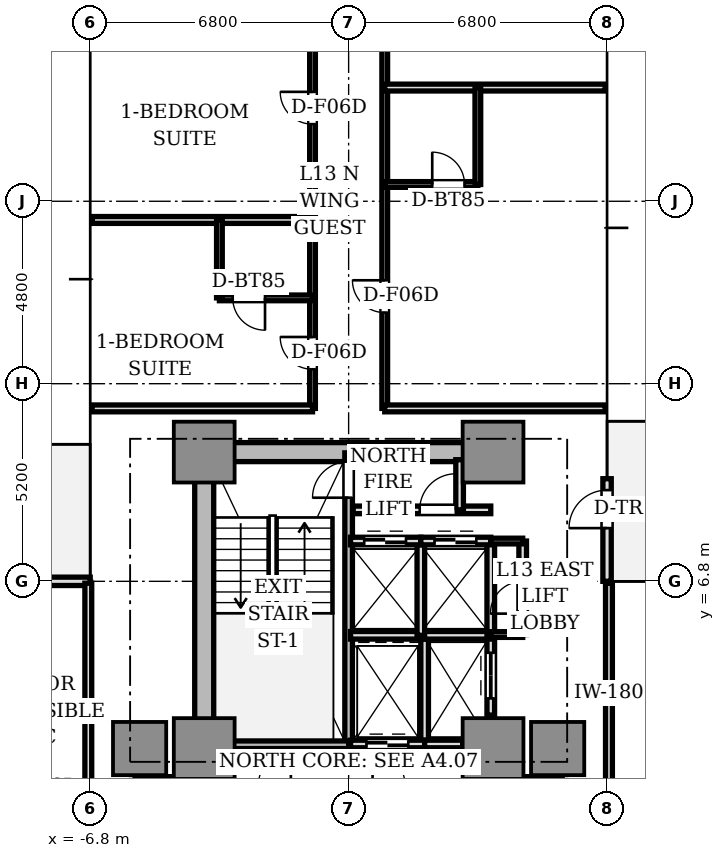
"""IFC4 building model, lengths in metres.
Left out: names, types, materials, properties, quantities, classifications, styles, units other than length and angle.
Written with IfcOpenShell. Run it as: python <this file> out.ifc"""

import sys

from ifc_helpers import new_model, si_unit, direction, frame, frame_2d, origin, origin_2d, place, context, subcontext, project, spatial, rectangle, extrude, source, transform, mapped, element, fill, save


model = new_model("IFC4")
c1 = context("Model", 3, precision=1e-05, world=origin(), true_north=direction((0.0, 1.0)))
c2 = subcontext(c1, "Body", "Model", "MODEL_VIEW")
j1 = project(units=[si_unit("LENGTHUNIT", "METRE"), si_unit("PLANEANGLEUNIT", "RADIAN")], contexts=[c1])
p1 = place(None, origin())
s1 = spatial("IfcSite", under=j1, at=p1, CompositionType="ELEMENT")
p2 = place(p1, origin())
s2 = spatial("IfcBuilding", under=s1, at=p2, CompositionType="ELEMENT")
p3 = place(p2, frame((0.0, 0.0, 51.05)))
s3 = spatial("IfcBuildingStorey", under=s2, at=p3, CompositionType="ELEMENT", Elevation=51.05)
p4 = place(p3, frame((-3.55, 10.2, 0.0), z_axis=(0.0, 0.0, 1.0), x_axis=(1.0, 0.0, 0.0)))
e1 = element("IfcWall", 1, at=p4, inside=s3, PredefinedType="SHEAR", context=c2, shape_type="SweptSolid", body=[
    extrude(rectangle(XDim=7.1, YDim=0.5, at=frame_2d((3.55, 0.0))), origin(), (0.0, 0.0, 1.0), 3.11),
])
p5 = place(p3, frame((-3.8, 2.85, 0.0), z_axis=(0.0, 0.0, 1.0), x_axis=(0.0, 1.0, 0.0)))
e2 = element("IfcWall", 2, at=p5, inside=s3, PredefinedType="SHEAR", context=c2, shape_type="SweptSolid", body=[
    extrude(rectangle(XDim=6.9, YDim=0.5, at=frame_2d((3.45, 0.0))), origin(), (0.0, 0.0, 1.0), 3.11),
])
m1 = source(origin(), c2, "Body", "SweptSolid", [
    extrude(rectangle(XDim=1.6, YDim=1.6, at=origin_2d()), origin(), (0.0, 0.0, 1.0), 3.11),
])
for number, where, z_axis, x_axis in (
    (3, (-3.8, 2.4, 0.0), (0.0, 0.0, 1.0), (1.0, 0.0, 0.0)),
    (4, (3.8, 2.4, 0.0), (0.0, 0.0, 1.0), (1.0, 0.0, 0.0)),
    (5, (-3.8, 10.2, 0.0), (0.0, 0.0, 1.0), (1.0, 0.0, 0.0)),
    (6, (3.8, 10.2, 0.0), (0.0, 0.0, 1.0), (1.0, 0.0, 0.0)),
):
    element("IfcColumn", number, at=place(p3, frame(where, z_axis=z_axis, x_axis=x_axis)), inside=s3, PredefinedType="COLUMN", context=c2, shape_type="MappedRepresentation", body=[
        mapped(m1, transform((0.0, 0.0, 0.0), scale=1.0)),
    ])
m2 = source(origin(), c2, "Body", "SweptSolid", [
    extrude(rectangle(XDim=1.4, YDim=1.4, at=origin_2d()), origin(), (0.0, 0.0, 1.0), 3.11),
])
for number, where, z_axis, x_axis in (
    (7, (5.5, 2.4, 0.0), (0.0, 0.0, 1.0), (1.0, 0.0, 0.0)),
    (8, (-5.5, 2.4, 0.0), (0.0, 0.0, 1.0), (1.0, 0.0, 0.0)),
):
    element("IfcColumn", number, at=place(p3, frame(where, z_axis=z_axis, x_axis=x_axis)), inside=s3, PredefinedType="COLUMN", context=c2, shape_type="MappedRepresentation", body=[
        mapped(m2, transform((0.0, 0.0, 0.0), scale=1.0)),
    ])
p6 = place(p3, frame((6.8, 6.8, 0.0), z_axis=(0.0, 0.0, 1.0), x_axis=(0.0, 1.0, 0.0)))
e9 = element("IfcWall", 9, at=p6, inside=s3, PredefinedType="STANDARD", context=c2, shape_type="SweptSolid", body=[
    extrude(rectangle(XDim=2.7, YDim=0.22, at=frame_2d((1.35, 0.0))), origin(), (0.0, 0.0, 1.0), 3.11),
])
p7 = place(p6, frame((1.4, 0.0, 0.0)))
e10 = element("IfcOpeningElement", 10, at=p7, cuts=e9, PredefinedType="OPENING", context=c2, shape_type="SweptSolid", body=[
    extrude(rectangle(XDim=1.0, YDim=2.2, at=frame_2d((0.5, 1.1))), frame((0.0, 0.12, 0.0), z_axis=(0.0, -1.0, 0.0), x_axis=(1.0, 0.0, 0.0)), (0.0, 0.0, 1.0), 0.24),
])
p8 = place(p3, frame((-6.8, 6.8, 0.0), z_axis=(0.0, 0.0, 1.0), x_axis=(-1.0, 0.0, 0.0)))
e11 = element("IfcWall", 11, at=p8, inside=s3, PredefinedType="STANDARD", context=c2, shape_type="SweptSolid", body=[
    extrude(rectangle(XDim=2.7, YDim=0.22, at=frame_2d((1.35, 0.0))), origin(), (0.0, 0.0, 1.0), 3.11),
])
p9 = place(p8, frame((1.4, 0.0, 0.0)))
e12 = element("IfcOpeningElement", 12, at=p9, cuts=e11, PredefinedType="OPENING", context=c2, shape_type="SweptSolid", body=[
    extrude(rectangle(XDim=1.0, YDim=2.2, at=frame_2d((0.5, 1.1))), frame((0.0, 0.12, 0.0), z_axis=(0.0, -1.0, 0.0), x_axis=(1.0, 0.0, 0.0)), (0.0, 0.0, 1.0), 0.24),
])
p10 = place(p3, frame((0.0, 2.5, 0.0), z_axis=(0.0, 0.0, 1.0), x_axis=(0.0, 1.0, 0.0)))
e13 = element("IfcWall", 13, at=p10, inside=s3, PredefinedType="SOLIDWALL", context=c2, shape_type="SweptSolid", body=[
    extrude(rectangle(XDim=7.68, YDim=0.2, at=frame_2d((3.84, 0.0))), origin(), (0.0, 0.0, 1.0), 3.11),
])
p11 = place(p10, frame((6.5, 0.0, 0.0)))
e14 = element("IfcOpeningElement", 14, at=p11, cuts=e13, PredefinedType="OPENING", context=c2, shape_type="SweptSolid", body=[
    extrude(rectangle(XDim=0.95, YDim=2.15, at=frame_2d((0.475, 1.075))), frame((0.0, 0.11, 0.0), z_axis=(0.0, -1.0, 0.0), x_axis=(1.0, 0.0, 0.0)), (0.0, 0.0, 1.0), 0.22),
])
p12 = place(p3, frame((-3.72, 2.5, 0.0), z_axis=(0.0, 0.0, 1.0), x_axis=(1.0, 0.0, 0.0)))
e15 = element("IfcWall", 15, at=p12, inside=s3, PredefinedType="SOLIDWALL", context=c2, shape_type="SweptSolid", body=[
    extrude(rectangle(XDim=3.72, YDim=0.2, at=frame_2d((1.86, 0.0))), origin(), (0.0, 0.0, 1.0), 3.11),
])
p13 = place(p3, frame((2.0, 2.5, 0.0), z_axis=(0.0, 0.0, 1.0), x_axis=(0.0, 1.0, 0.0)))
e16 = element("IfcWall", 16, at=p13, inside=s3, PredefinedType="SOLIDWALL", context=c2, shape_type="SweptSolid", body=[
    extrude(rectangle(XDim=2.78, YDim=0.2, at=frame_2d((1.39, 0.0))), origin(), (0.0, 0.0, 1.0), 2.66),
])
p14 = place(p3, frame((0.05, 2.52, 0.0), z_axis=(0.0, 0.0, 1.0), x_axis=(1.0, 0.0, 0.0)))
e17 = element("IfcWall", 17, at=p14, inside=s3, PredefinedType="SOLIDWALL", context=c2, shape_type="SweptSolid", body=[
    extrude(rectangle(XDim=1.95, YDim=0.2, at=frame_2d((0.975, 0.0))), origin(), (0.0, 0.0, 1.0), 2.66),
])
p15 = place(p14, frame((0.42, 0.0, 0.0)))
e18 = element("IfcOpeningElement", 18, at=p15, cuts=e17, PredefinedType="OPENING", context=c2, shape_type="SweptSolid", body=[
    extrude(rectangle(XDim=1.1, YDim=2.2, at=frame_2d((0.55, 1.1))), frame((0.0, 0.11, 0.0), z_axis=(0.0, -1.0, 0.0), x_axis=(1.0, 0.0, 0.0)), (0.0, 0.0, 1.0), 0.22),
])
p16 = place(p3, frame((2.0, 2.52, 0.0), z_axis=(0.0, 0.0, 1.0), x_axis=(1.0, 0.0, 0.0)))
e19 = element("IfcWall", 19, at=p16, inside=s3, PredefinedType="SOLIDWALL", context=c2, shape_type="SweptSolid", body=[
    extrude(rectangle(XDim=1.0, YDim=0.2, at=frame_2d((0.5, 0.0))), origin(), (0.0, 0.0, 1.0), 2.66),
])
p17 = place(p3, frame((3.74, 3.28, 0.0), z_axis=(0.0, 0.0, 1.0), x_axis=(0.0, 1.0, 0.0)))
e20 = element("IfcWall", 20, at=p17, inside=s3, PredefinedType="SOLIDWALL", context=c2, shape_type="SweptSolid", body=[
    extrude(rectangle(XDim=2.08, YDim=0.2, at=frame_2d((1.04, 0.0))), origin(), (0.0, 0.0, 1.0), 2.66),
])
p18 = place(p17, frame((0.44, 0.0, 0.0)))
e21 = element("IfcOpeningElement", 21, at=p18, cuts=e20, PredefinedType="OPENING", context=c2, shape_type="SweptSolid", body=[
    extrude(rectangle(XDim=1.2, YDim=2.2, at=frame_2d((0.6, 1.1))), frame((0.0, 0.11, 0.0), z_axis=(0.0, -1.0, 0.0), x_axis=(1.0, 0.0, 0.0)), (0.0, 0.0, 1.0), 0.22),
])
p19 = place(p3, frame((0.05, 5.38, 0.0), z_axis=(0.0, 0.0, 1.0), x_axis=(1.0, 0.0, 0.0)))
e22 = element("IfcWall", 22, at=p19, inside=s3, PredefinedType="SOLIDWALL", context=c2, shape_type="SweptSolid", body=[
    extrude(rectangle(XDim=3.69, YDim=0.2, at=frame_2d((1.845, 0.0))), origin(), (0.0, 0.0, 1.0), 2.66),
])
p20 = place(p3, frame((1.9, 5.38, 0.0), z_axis=(0.0, 0.0, 1.0), x_axis=(0.0, 1.0, 0.0)))
e23 = element("IfcWall", 23, at=p20, inside=s3, PredefinedType="SOLIDWALL", context=c2, shape_type="SweptSolid", body=[
    extrude(rectangle(XDim=2.48, YDim=0.2, at=frame_2d((1.24, 0.0))), origin(), (0.0, 0.0, 1.0), 2.66),
])
p21 = place(p3, frame((0.05, 7.86, 0.0), z_axis=(0.0, 0.0, 1.0), x_axis=(1.0, 0.0, 0.0)))
e24 = element("IfcWall", 24, at=p21, inside=s3, PredefinedType="SOLIDWALL", context=c2, shape_type="SweptSolid", body=[
    extrude(rectangle(XDim=1.85, YDim=0.2, at=frame_2d((0.925, 0.0))), origin(), (0.0, 0.0, 1.0), 2.66),
])
p22 = place(p21, frame((0.36, 0.0, 0.0)))
e25 = element("IfcOpeningElement", 25, at=p22, cuts=e24, PredefinedType="OPENING", context=c2, shape_type="SweptSolid", body=[
    extrude(rectangle(XDim=1.1, YDim=2.2, at=frame_2d((0.55, 1.1))), frame((0.0, 0.11, 0.0), z_axis=(0.0, -1.0, 0.0), x_axis=(1.0, 0.0, 0.0)), (0.0, 0.0, 1.0), 0.22),
])
p23 = place(p3, frame((3.74, 5.38, 0.0), z_axis=(0.0, 0.0, 1.0), x_axis=(0.0, 1.0, 0.0)))
e26 = element("IfcWall", 26, at=p23, inside=s3, PredefinedType="SOLIDWALL", context=c2, shape_type="SweptSolid", body=[
    extrude(rectangle(XDim=2.48, YDim=0.2, at=frame_2d((1.24, 0.0))), origin(), (0.0, 0.0, 1.0), 2.66),
])
p24 = place(p3, frame((1.9, 7.86, 0.0), z_axis=(0.0, 0.0, 1.0), x_axis=(1.0, 0.0, 0.0)))
e27 = element("IfcWall", 27, at=p24, inside=s3, PredefinedType="SOLIDWALL", context=c2, shape_type="SweptSolid", body=[
    extrude(rectangle(XDim=1.84, YDim=0.2, at=frame_2d((0.92, 0.0))), origin(), (0.0, 0.0, 1.0), 2.66),
])
p25 = place(p24, frame((0.36, 0.0, 0.0)))
e28 = element("IfcOpeningElement", 28, at=p25, cuts=e27, PredefinedType="OPENING", context=c2, shape_type="SweptSolid", body=[
    extrude(rectangle(XDim=1.1, YDim=2.2, at=frame_2d((0.55, 1.1))), frame((0.0, 0.11, 0.0), z_axis=(0.0, -1.0, 0.0), x_axis=(1.0, 0.0, 0.0)), (0.0, 0.0, 1.0), 0.22),
])
for number, where, z_axis, x_axis in (
    (29, (3.98, 1.56, 0.0), (0.0, 0.0, 1.0), (1.0, 0.0, 0.0)),
    (30, (-5.62, 1.56, 0.0), (0.0, 0.0, 1.0), (1.0, 0.0, 0.0)),
):
    element("IfcWall", number, at=place(p3, frame(where, z_axis=z_axis, x_axis=x_axis)), inside=s3, PredefinedType="SOLIDWALL", context=c2, shape_type="SweptSolid", body=[
        extrude(rectangle(XDim=1.64, YDim=0.2, at=frame_2d((0.82, 0.0))), origin(), (0.0, 0.0, 1.0), 2.66),
    ])
p26 = place(p3, frame((0.12, 8.68, 0.0), z_axis=(0.0, 0.0, 1.0), x_axis=(1.0, 0.0, 0.0)))
e31 = element("IfcWall", 31, at=p26, inside=s3, PredefinedType="SOLIDWALL", context=c2, shape_type="SweptSolid", body=[
    extrude(rectangle(XDim=3.62, YDim=0.2, at=frame_2d((1.81, 0.0))), origin(), (0.0, 0.0, 1.0), 2.66),
])
p27 = place(p26, frame((1.75, 0.0, 0.0)))
e32 = element("IfcOpeningElement", 32, at=p27, cuts=e31, PredefinedType="OPENING", context=c2, shape_type="SweptSolid", body=[
    extrude(rectangle(XDim=0.95, YDim=2.15, at=frame_2d((0.475, 1.075))), frame((0.0, 0.11, 0.0), z_axis=(0.0, -1.0, 0.0), x_axis=(1.0, 0.0, 0.0)), (0.0, 0.0, 1.0), 0.22),
])
p28 = place(p3, frame((2.92, 8.68, 0.0), z_axis=(0.0, 0.0, 1.0), x_axis=(0.0, 1.0, 0.0)))
e33 = element("IfcWall", 33, at=p28, inside=s3, PredefinedType="SOLIDWALL", context=c2, shape_type="SweptSolid", body=[
    extrude(rectangle(XDim=1.32, YDim=0.2, at=frame_2d((0.66, 0.0))), origin(), (0.0, 0.0, 1.0), 2.66),
])
p29 = place(p3, frame((4.58, 5.4, 0.0), z_axis=(0.0, 0.0, 1.0), x_axis=(0.0, 1.0, 0.0)))
e34 = element("IfcWall", 34, at=p29, inside=s3, PredefinedType="SOLIDWALL", context=c2, shape_type="SweptSolid", body=[
    extrude(rectangle(XDim=2.46, YDim=0.2, at=frame_2d((1.23, 0.0))), origin(), (0.0, 0.0, 1.0), 2.66),
])
p30 = place(p29, frame((0.55, 0.0, 0.0)))
e35 = element("IfcOpeningElement", 35, at=p30, cuts=e34, PredefinedType="OPENING", context=c2, shape_type="SweptSolid", body=[
    extrude(rectangle(XDim=0.85, YDim=2.1, at=frame_2d((0.425, 1.05))), frame((0.0, 0.11, 0.0), z_axis=(0.0, -1.0, 0.0), x_axis=(1.0, 0.0, 0.0)), (0.0, 0.0, 1.0), 0.22),
])
for number, where, z_axis, x_axis in (
    (36, (3.74, 5.4, 0.0), (0.0, 0.0, 1.0), (1.0, 0.0, 0.0)),
    (37, (3.74, 7.86, 0.0), (0.0, 0.0, 1.0), (1.0, 0.0, 0.0)),
):
    element("IfcWall", number, at=place(p3, frame(where, z_axis=z_axis, x_axis=x_axis)), inside=s3, PredefinedType="PARTITIONING", context=c2, shape_type="SweptSolid", body=[
        extrude(rectangle(XDim=0.84, YDim=0.15, at=frame_2d((0.42, 0.0))), origin(), (0.0, 0.0, 1.0), 2.66),
    ])
p31 = place(p3, frame((6.85, 0.95, 0.0), z_axis=(0.0, 0.0, 1.0), x_axis=(0.0, 1.0, 0.0)))
e38 = element("IfcWall", 38, at=p31, inside=s3, PredefinedType="PARTITIONING", context=c2, shape_type="SweptSolid", body=[
    extrude(rectangle(XDim=5.8, YDim=0.18, at=frame_2d((2.9, 0.0))), origin(), (0.0, 0.0, 1.0), 2.66),
])
p32 = place(p3, frame((-0.95, 11.35, 0.0), z_axis=(0.0, 0.0, 1.0), x_axis=(0.0, 1.0, 0.0)))
e39 = element("IfcWall", 39, at=p32, inside=s3, PredefinedType="PARTITIONING", context=c2, shape_type="SweptSolid", body=[
    extrude(rectangle(XDim=13.4, YDim=0.15, at=frame_2d((6.7, 0.0))), origin(), (0.0, 0.0, 1.0), 2.66),
])
p33 = place(p32, frame((1.029, 0.0, 0.0)))
e40 = element("IfcOpeningElement", 40, at=p33, cuts=e39, PredefinedType="OPENING", context=c2, shape_type="SweptSolid", body=[
    extrude(rectangle(XDim=0.85, YDim=2.1, at=frame_2d((0.425, 1.05))), frame((0.0, 0.085, 0.0), z_axis=(0.0, -1.0, 0.0), x_axis=(1.0, 0.0, 0.0)), (0.0, 0.0, 1.0), 0.17),
])
p34 = place(p32, frame((7.479, 0.0, 0.0)))
e41 = element("IfcOpeningElement", 41, at=p34, cuts=e39, PredefinedType="OPENING", context=c2, shape_type="SweptSolid", body=[
    extrude(rectangle(XDim=0.85, YDim=2.1, at=frame_2d((0.425, 1.05))), frame((0.0, 0.085, 0.0), z_axis=(0.0, -1.0, 0.0), x_axis=(1.0, 0.0, 0.0)), (0.0, 0.0, 1.0), 0.17),
])
p35 = place(p3, frame((0.95, 11.35, 0.0), z_axis=(0.0, 0.0, 1.0), x_axis=(0.0, 1.0, 0.0)))
e42 = element("IfcWall", 42, at=p35, inside=s3, PredefinedType="PARTITIONING", context=c2, shape_type="SweptSolid", body=[
    extrude(rectangle(XDim=13.4, YDim=0.15, at=frame_2d((6.7, 0.0))), origin(), (0.0, 0.0, 1.0), 2.66),
])
p36 = place(p35, frame((2.521, 0.0, 0.0)))
e43 = element("IfcOpeningElement", 43, at=p36, cuts=e42, PredefinedType="OPENING", context=c2, shape_type="SweptSolid", body=[
    extrude(rectangle(XDim=0.85, YDim=2.1, at=frame_2d((0.425, 1.05))), frame((0.0, 0.085, 0.0), z_axis=(0.0, -1.0, 0.0), x_axis=(1.0, 0.0, 0.0)), (0.0, 0.0, 1.0), 0.17),
])
p37 = place(p35, frame((9.471, 0.0, 0.0)))
e44 = element("IfcOpeningElement", 44, at=p37, cuts=e42, PredefinedType="OPENING", context=c2, shape_type="SweptSolid", body=[
    extrude(rectangle(XDim=0.85, YDim=2.1, at=frame_2d((0.425, 1.05))), frame((0.0, 0.085, 0.0), z_axis=(0.0, -1.0, 0.0), x_axis=(1.0, 0.0, 0.0)), (0.0, 0.0, 1.0), 0.17),
])
for number, where, z_axis, x_axis in (
    (45, (-0.95, 11.35, 0.0), (0.0, 0.0, 1.0), (-1.0, 0.0, 0.0)),
    (46, (6.75, 11.35, 0.0), (0.0, 0.0, 1.0), (-1.0, 0.0, 0.0)),
    (47, (-0.95, 16.308, 0.0), (0.0, 0.0, 1.0), (-1.0, 0.0, 0.0)),
):
    element("IfcWall", number, at=place(p3, frame(where, z_axis=z_axis, x_axis=x_axis)), inside=s3, PredefinedType="PARTITIONING", context=c2, shape_type="SweptSolid", body=[
        extrude(rectangle(XDim=5.8, YDim=0.18, at=frame_2d((2.9, 0.0))), origin(), (0.0, 0.0, 1.0), 2.66),
    ])
p38 = place(p3, frame((-0.95, 14.258, 0.0), z_axis=(0.0, 0.0, 1.0), x_axis=(-1.0, 0.0, 0.0)))
e48 = element("IfcWall", 48, at=p38, inside=s3, PredefinedType="PARTITIONING", context=c2, shape_type="SweptSolid", body=[
    extrude(rectangle(XDim=2.45, YDim=0.15, at=frame_2d((1.225, 0.0))), origin(), (0.0, 0.0, 1.0), 2.66),
])
p39 = place(p38, frame((1.25, 0.0, 0.0)))
e49 = element("IfcOpeningElement", 49, at=p39, cuts=e48, PredefinedType="OPENING", context=c2, shape_type="SweptSolid", body=[
    extrude(rectangle(XDim=0.85, YDim=2.1, at=frame_2d((0.425, 1.05))), frame((0.0, 0.085, 0.0), z_axis=(0.0, -1.0, 0.0), x_axis=(1.0, 0.0, 0.0)), (0.0, 0.0, 1.0), 0.17),
])
p40 = place(p3, frame((-3.4, 14.258, 0.0), z_axis=(0.0, 0.0, 1.0), x_axis=(0.0, 1.0, 0.0)))
e50 = element("IfcWall", 50, at=p40, inside=s3, PredefinedType="PARTITIONING", context=c2, shape_type="SweptSolid", body=[
    extrude(rectangle(XDim=2.05, YDim=0.15, at=frame_2d((1.025, 0.0))), origin(), (0.0, 0.0, 1.0), 2.66),
])
p41 = place(p3, frame((0.95, 19.792, 0.0), z_axis=(0.0, 0.0, 1.0), x_axis=(1.0, 0.0, 0.0)))
e51 = element("IfcWall", 51, at=p41, inside=s3, PredefinedType="PARTITIONING", context=c2, shape_type="SweptSolid", body=[
    extrude(rectangle(XDim=5.8, YDim=0.18, at=frame_2d((2.9, 0.0))), origin(), (0.0, 0.0, 1.0), 2.66),
])
p42 = place(p3, frame((0.95, 17.242, 0.0), z_axis=(0.0, 0.0, 1.0), x_axis=(1.0, 0.0, 0.0)))
e52 = element("IfcWall", 52, at=p42, inside=s3, PredefinedType="PARTITIONING", context=c2, shape_type="SweptSolid", body=[
    extrude(rectangle(XDim=2.45, YDim=0.15, at=frame_2d((1.225, 0.0))), origin(), (0.0, 0.0, 1.0), 2.66),
])
p43 = place(p42, frame((1.25, 0.0, 0.0)))
e53 = element("IfcOpeningElement", 53, at=p43, cuts=e52, PredefinedType="OPENING", context=c2, shape_type="SweptSolid", body=[
    extrude(rectangle(XDim=0.85, YDim=2.1, at=frame_2d((0.425, 1.05))), frame((0.0, 0.085, 0.0), z_axis=(0.0, -1.0, 0.0), x_axis=(1.0, 0.0, 0.0)), (0.0, 0.0, 1.0), 0.17),
])
p44 = place(p3, frame((3.4, 17.242, 0.0), z_axis=(0.0, 0.0, 1.0), x_axis=(0.0, 1.0, 0.0)))
e54 = element("IfcWall", 54, at=p44, inside=s3, PredefinedType="PARTITIONING", context=c2, shape_type="SweptSolid", body=[
    extrude(rectangle(XDim=2.55, YDim=0.15, at=frame_2d((1.275, 0.0))), origin(), (0.0, 0.0, 1.0), 2.66),
])
p45 = place(p3, frame((-6.85, 6.75, 0.0), z_axis=(0.0, 0.0, 1.0), x_axis=(0.0, -1.0, 0.0)))
e55 = element("IfcWall", 55, at=p45, inside=s3, PredefinedType="PARTITIONING", context=c2, shape_type="SweptSolid", body=[
    extrude(rectangle(XDim=5.8, YDim=0.18, at=frame_2d((2.9, 0.0))), origin(), (0.0, 0.0, 1.0), 2.66),
])
m3 = source(origin(), c2, "Body", "SweptSolid", [
    extrude(rectangle(XDim=1.0, YDim=0.05, at=origin_2d()), origin(), (0.0, 0.0, 1.0), 2.2),
])
p46 = place(p7, frame((0.5, 0.0, 0.0)))
e56 = element("IfcDoor", 56, at=p46, inside=s3, OperationType="SINGLE_SWING_LEFT", PredefinedType="DOOR", context=c2, shape_type="MappedRepresentation", body=[
    mapped(m3, transform((0.0, 0.0, 0.0), scale=1.0)),
])
fill(e10, e56)
m4 = source(origin(), c2, "Body", "SweptSolid", [
    extrude(rectangle(XDim=1.1, YDim=0.05, at=origin_2d()), origin(), (0.0, 0.0, 1.0), 2.2),
])
p47 = place(p15, frame((0.55, 0.0, 0.0)))
e57 = element("IfcDoor", 57, at=p47, inside=s3, OperationType="DOUBLE_DOOR_SLIDING", PredefinedType="DOOR", context=c2, shape_type="MappedRepresentation", body=[
    mapped(m4, transform((0.0, 0.0, 0.0), scale=1.0)),
])
fill(e18, e57)
m5 = source(origin(), c2, "Body", "SweptSolid", [
    extrude(rectangle(XDim=1.2, YDim=0.05, at=origin_2d()), origin(), (0.0, 0.0, 1.0), 2.2),
])
p48 = place(p18, frame((0.6, 0.0, 0.0)))
e58 = element("IfcDoor", 58, at=p48, inside=s3, OperationType="DOUBLE_DOOR_SLIDING", PredefinedType="DOOR", context=c2, shape_type="MappedRepresentation", body=[
    mapped(m5, transform((0.0, 0.0, 0.0), scale=1.0)),
])
fill(e21, e58)
p49 = place(p22, frame((0.55, 0.0, 0.0)))
e59 = element("IfcDoor", 59, at=p49, inside=s3, OperationType="DOUBLE_DOOR_SLIDING", PredefinedType="DOOR", context=c2, shape_type="MappedRepresentation", body=[
    mapped(m4, transform((0.0, 0.0, 0.0), scale=1.0)),
])
fill(e25, e59)
p50 = place(p25, frame((0.55, 0.0, 0.0)))
e60 = element("IfcDoor", 60, at=p50, inside=s3, OperationType="DOUBLE_DOOR_SLIDING", PredefinedType="DOOR", context=c2, shape_type="MappedRepresentation", body=[
    mapped(m4, transform((0.0, 0.0, 0.0), scale=1.0)),
])
fill(e28, e60)
m6 = source(origin(), c2, "Body", "SweptSolid", [
    extrude(rectangle(XDim=0.95, YDim=0.05, at=origin_2d()), origin(), (0.0, 0.0, 1.0), 2.15),
])
p51 = place(p11, frame((0.475, 0.0, 0.0)))
e61 = element("IfcDoor", 61, at=p51, inside=s3, OperationType="SINGLE_SWING_LEFT", PredefinedType="DOOR", context=c2, shape_type="MappedRepresentation", body=[
    mapped(m6, transform((0.0, 0.0, 0.0), scale=1.0)),
])
fill(e14, e61)
p52 = place(p27, frame((0.475, 0.0, 0.0)))
e62 = element("IfcDoor", 62, at=p52, inside=s3, OperationType="SINGLE_SWING_RIGHT", PredefinedType="DOOR", context=c2, shape_type="MappedRepresentation", body=[
    mapped(m6, transform((0.0, 0.0, 0.0), scale=1.0)),
])
fill(e32, e62)
m7 = source(origin(), c2, "Body", "SweptSolid", [
    extrude(rectangle(XDim=0.85, YDim=0.05, at=origin_2d()), origin(), (0.0, 0.0, 1.0), 2.1),
])
p53 = place(p30, frame((0.425, 0.0, 0.0)))
e63 = element("IfcDoor", 63, at=p53, inside=s3, OperationType="SINGLE_SWING_LEFT", PredefinedType="DOOR", context=c2, shape_type="MappedRepresentation", body=[
    mapped(m7, transform((0.0, 0.0, 0.0), scale=1.0)),
])
fill(e35, e63)
p54 = place(p39, frame((0.425, 0.0, 0.0)))
e64 = element("IfcDoor", 64, at=p54, inside=s3, OperationType="SINGLE_SWING_LEFT", PredefinedType="DOOR", context=c2, shape_type="MappedRepresentation", body=[
    mapped(m7, transform((0.0, 0.0, 0.0), scale=1.0)),
])
fill(e49, e64)
p55 = place(p33, frame((0.425, 0.0, 0.0)))
e65 = element("IfcDoor", 65, at=p55, inside=s3, OperationType="SINGLE_SWING_RIGHT", PredefinedType="DOOR", context=c2, shape_type="MappedRepresentation", body=[
    mapped(m7, transform((0.0, 0.0, 0.0), scale=1.0)),
])
fill(e40, e65)
p56 = place(p34, frame((0.425, 0.0, 0.0)))
e66 = element("IfcDoor", 66, at=p56, inside=s3, OperationType="SINGLE_SWING_RIGHT", PredefinedType="DOOR", context=c2, shape_type="MappedRepresentation", body=[
    mapped(m7, transform((0.0, 0.0, 0.0), scale=1.0)),
])
fill(e41, e66)
p57 = place(p43, frame((0.425, 0.0, 0.0)))
e67 = element("IfcDoor", 67, at=p57, inside=s3, OperationType="SINGLE_SWING_LEFT", PredefinedType="DOOR", context=c2, shape_type="MappedRepresentation", body=[
    mapped(m7, transform((0.0, 0.0, 0.0), scale=1.0)),
])
fill(e53, e67)
p58 = place(p36, frame((0.425, 0.0, 0.0)))
e68 = element("IfcDoor", 68, at=p58, inside=s3, OperationType="SINGLE_SWING_RIGHT", PredefinedType="DOOR", context=c2, shape_type="MappedRepresentation", body=[
    mapped(m7, transform((0.0, 0.0, 0.0), scale=1.0)),
])
fill(e43, e68)
save(model, sys.argv[1])
